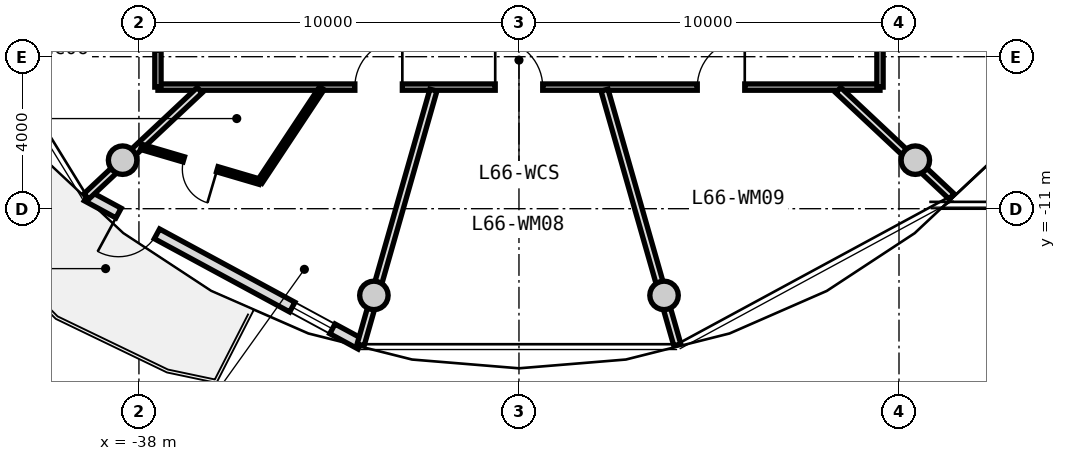
"""IFC4 building model, lengths in metres.
Left out: names, types, materials, properties, quantities, classifications, styles, units other than length and angle.
Written with IfcOpenShell. Run it as: python <this file> out.ifc"""

import sys

from ifc_helpers import new_model, si_unit, direction, frame, frame_2d, origin, origin_2d, place, context, subcontext, project, spatial, rectangle, circle, extrude, source, transform, mapped, element, fill, save


model = new_model("IFC4")
c1 = context("Model", 3, precision=1e-05, world=origin(), true_north=direction((0.0, 1.0)))
c2 = subcontext(c1, "Body", "Model", "MODEL_VIEW")
j1 = project(units=[si_unit("LENGTHUNIT", "METRE"), si_unit("PLANEANGLEUNIT", "RADIAN")], contexts=[c1])
p1 = place(None, origin())
s1 = spatial("IfcSite", under=j1, at=p1, CompositionType="ELEMENT")
p2 = place(p1, origin())
s2 = spatial("IfcBuilding", under=s1, at=p2, CompositionType="ELEMENT")
p3 = place(p2, frame((0.0, 0.0, 213.9)))
s3 = spatial("IfcBuildingStorey", under=s2, at=p3, CompositionType="ELEMENT", Elevation=213.9)
m1 = source(origin(), c2, "Body", "SweptSolid", [
    extrude(circle(Radius=0.375, at=origin_2d()), origin(), (0.0, 0.0, 1.0), 3.05),
])
for number, where, z_axis, x_axis in (
    (1, (-38.43, -9.723, 0.0), (0.0, 0.0, 1.0), (1.0, 0.0, 0.0)),
    (2, (-31.818, -13.281, 0.0), (0.0, 0.0, 1.0), (1.0, 0.0, 0.0)),
    (3, (-24.182, -13.281, 0.0), (0.0, 0.0, 1.0), (1.0, 0.0, 0.0)),
    (4, (-17.57, -9.723, 0.0), (0.0, 0.0, 1.0), (1.0, 0.0, 0.0)),
):
    element("IfcColumn", number, at=place(p3, frame(where, z_axis=z_axis, x_axis=x_axis)), inside=s3, PredefinedType="COLUMN", context=c2, shape_type="MappedRepresentation", body=[
        mapped(m1, transform((0.0, 0.0, 0.0), x_axis=(1.0, 0.0, 0.0), y_axis=(0.0, 1.0, 0.0), z_axis=(0.0, 0.0, 1.0), scale=1.0)),
    ])
m2 = source(origin(), c2, "Body", "SweptSolid", [
    extrude(rectangle(XDim=8.197, YDim=0.29, at=frame_2d((4.099, 0.0))), origin(), (0.0, 0.0, 1.0), 2.76),
])
p4 = place(p3, frame((-32.162, -14.566, 0.0), z_axis=(0.0, 0.0, 1.0), x_axis=(-0.879369910001, 0.476139224791, 0.0)))
e5 = element("IfcWall", 5, at=p4, inside=s3, PredefinedType="SOLIDWALL", context=c2, shape_type="MappedRepresentation", body=[
    mapped(m2, transform((0.0, 0.0, 0.0), x_axis=(1.0, 0.0, 0.0), y_axis=(0.0, 1.0, 0.0), z_axis=(0.0, 0.0, 1.0), scale=1.0)),
])
p5 = place(p4, frame((6.1, 0.0, 0.0)))
e6 = element("IfcOpeningElement", 6, at=p5, cuts=e5, PredefinedType="OPENING", context=c2, shape_type="SweptSolid", body=[
    extrude(rectangle(XDim=1.15, YDim=2.25, at=frame_2d((0.575, 1.125))), frame((0.0, 0.155, 0.0), z_axis=(0.0, -1.0, 0.0), x_axis=(1.0, 0.0, 0.0)), (0.0, 0.0, 1.0), 0.31),
])
p6 = place(p4, frame((0.85, 0.0, 0.85)))
e7 = element("IfcOpeningElement", 7, at=p6, cuts=e5, PredefinedType="OPENING", context=c2, shape_type="SweptSolid", body=[
    extrude(rectangle(XDim=1.2, YDim=1.5, at=frame_2d((0.6, 0.75))), frame((0.0, 0.155, 0.0), z_axis=(0.0, -1.0, 0.0), x_axis=(1.0, 0.0, 0.0)), (0.0, 0.0, 1.0), 0.31),
])
m3 = source(origin(), c2, "Body", "SweptSolid", [
    extrude(rectangle(XDim=19.0, YDim=0.165, at=frame_2d((9.5, 0.0))), origin(), (0.0, 0.0, 1.0), 2.745),
])
p7 = place(p3, frame((-18.5, -7.8, 0.0), z_axis=(0.0, 0.0, 1.0), x_axis=(-1.0, 0.0, 0.0)))
e8 = element("IfcWall", 8, at=p7, inside=s3, PredefinedType="PARTITIONING", context=c2, shape_type="MappedRepresentation", body=[
    mapped(m3, transform((0.0, 0.0, 0.0), x_axis=(1.0, 0.0, 0.0), y_axis=(0.0, 1.0, 0.0), z_axis=(0.0, 0.0, 1.0), scale=1.0)),
])
p8 = place(p7, frame((12.569, 0.0, 0.0)))
e9 = element("IfcOpeningElement", 9, at=p8, cuts=e8, PredefinedType="OPENING", context=c2, shape_type="SweptSolid", body=[
    extrude(rectangle(XDim=1.25, YDim=2.2, at=frame_2d((0.625, 1.1))), frame((0.0, 0.093, 0.0), z_axis=(0.0, -1.0, 0.0), x_axis=(1.0, 0.0, 0.0)), (0.0, 0.0, 1.0), 0.185),
])
p9 = place(p7, frame((8.875, 0.0, 0.0)))
e10 = element("IfcOpeningElement", 10, at=p9, cuts=e8, PredefinedType="OPENING", context=c2, shape_type="SweptSolid", body=[
    extrude(rectangle(XDim=1.25, YDim=2.2, at=frame_2d((0.625, 1.1))), frame((0.0, 0.093, 0.0), z_axis=(0.0, -1.0, 0.0), x_axis=(1.0, 0.0, 0.0)), (0.0, 0.0, 1.0), 0.185),
])
p10 = place(p7, frame((3.559, 0.0, 0.0)))
e11 = element("IfcOpeningElement", 11, at=p10, cuts=e8, PredefinedType="OPENING", context=c2, shape_type="SweptSolid", body=[
    extrude(rectangle(XDim=1.25, YDim=2.2, at=frame_2d((0.625, 1.1))), frame((0.0, 0.093, 0.0), z_axis=(0.0, -1.0, 0.0), x_axis=(1.0, 0.0, 0.0)), (0.0, 0.0, 1.0), 0.185),
])
m4 = source(origin(), c2, "Body", "SweptSolid", [
    extrude(rectangle(XDim=6.88, YDim=0.165, at=frame_2d((3.44, 0.0))), origin(), (0.0, 0.0, 1.0), 2.745),
])
p11 = place(p3, frame((-37.5, -7.8, 0.0), z_axis=(0.0, 0.0, 1.0), x_axis=(0.0, 1.0, 0.0)))
e12 = element("IfcWall", 12, at=p11, inside=s3, PredefinedType="PARTITIONING", context=c2, shape_type="MappedRepresentation", body=[
    mapped(m4, transform((0.0, 0.0, 0.0), x_axis=(1.0, 0.0, 0.0), y_axis=(0.0, 1.0, 0.0), z_axis=(0.0, 0.0, 1.0), scale=1.0)),
])
p12 = place(p11, frame((0.968, 0.0, 0.0)))
e13 = element("IfcOpeningElement", 13, at=p12, cuts=e12, PredefinedType="OPENING", context=c2, shape_type="SweptSolid", body=[
    extrude(rectangle(XDim=1.25, YDim=2.2, at=frame_2d((0.625, 1.1))), frame((0.0, 0.093, 0.0), z_axis=(0.0, -1.0, 0.0), x_axis=(1.0, 0.0, 0.0)), (0.0, 0.0, 1.0), 0.185),
])
p13 = place(p3, frame((-18.5, -0.92, 0.0), z_axis=(0.0, 0.0, 1.0), x_axis=(0.0, -1.0, 0.0)))
e14 = element("IfcWall", 14, at=p13, inside=s3, PredefinedType="PARTITIONING", context=c2, shape_type="MappedRepresentation", body=[
    mapped(m4, transform((0.0, 0.0, 0.0), x_axis=(1.0, 0.0, 0.0), y_axis=(0.0, 1.0, 0.0), z_axis=(0.0, 0.0, 1.0), scale=1.0)),
])
p14 = place(p13, frame((3.464, 0.0, 0.0)))
e15 = element("IfcOpeningElement", 15, at=p14, cuts=e14, PredefinedType="OPENING", context=c2, shape_type="SweptSolid", body=[
    extrude(rectangle(XDim=1.25, YDim=2.2, at=frame_2d((0.625, 1.1))), frame((0.0, 0.093, 0.0), z_axis=(0.0, -1.0, 0.0), x_axis=(1.0, 0.0, 0.0)), (0.0, 0.0, 1.0), 0.185),
])
m5 = source(origin(), c2, "Body", "SweptSolid", [
    extrude(rectangle(XDim=4.089, YDim=0.19, at=frame_2d((2.044, 0.0))), origin(), (0.0, 0.0, 1.0), 2.345),
])
p15 = place(p3, frame((-36.402, -7.88, 0.0), z_axis=(0.0, 0.0, 1.0), x_axis=(-0.729401273609, -0.684086092577, 0.0)))
e16 = element("IfcWall", 16, at=p15, inside=s3, PredefinedType="PARTITIONING", context=c2, shape_type="MappedRepresentation", body=[
    mapped(m5, transform((0.0, 0.0, 0.0), x_axis=(1.0, 0.0, 0.0), y_axis=(0.0, 1.0, 0.0), z_axis=(0.0, 0.0, 1.0), scale=1.0)),
])
m6 = source(origin(), c2, "Body", "SweptSolid", [
    extrude(rectangle(XDim=6.974, YDim=0.19, at=frame_2d((3.487, 0.0))), origin(), (0.0, 0.0, 1.0), 2.345),
])
p16 = place(p3, frame((-30.251, -7.88, 0.0), z_axis=(0.0, 0.0, 1.0), x_axis=(-0.274707256801, -0.961527910703, 0.0)))
e17 = element("IfcWall", 17, at=p16, inside=s3, PredefinedType="PARTITIONING", context=c2, shape_type="MappedRepresentation", body=[
    mapped(m6, transform((0.0, 0.0, 0.0), x_axis=(1.0, 0.0, 0.0), y_axis=(0.0, 1.0, 0.0), z_axis=(0.0, 0.0, 1.0), scale=1.0)),
])
m7 = source(origin(), c2, "Body", "SweptSolid", [
    extrude(rectangle(XDim=2.953, YDim=0.14, at=frame_2d((1.476, 0.0))), origin(), (0.0, 0.0, 1.0), 2.745),
])
p17 = place(p3, frame((-33.188, -7.83, 0.0), z_axis=(0.0, 0.0, 1.0), x_axis=(-0.552427436518, -0.833560991999, 0.0)))
e18 = element("IfcWall", 18, at=p17, inside=s3, PredefinedType="PARTITIONING", context=c2, shape_type="MappedRepresentation", body=[
    mapped(m7, transform((0.0, 0.0, 0.0), x_axis=(1.0, 0.0, 0.0), y_axis=(0.0, 1.0, 0.0), z_axis=(0.0, 0.0, 1.0), scale=1.0)),
])
m8 = source(origin(), c2, "Body", "SweptSolid", [
    extrude(rectangle(XDim=3.252, YDim=0.14, at=frame_2d((1.626, 0.0))), origin(), (0.0, 0.0, 1.0), 2.745),
])
p18 = place(p3, frame((-34.82, -10.291, 0.0), z_axis=(0.0, 0.0, 1.0), x_axis=(-0.959294945864, 0.282406102695, 0.0)))
e19 = element("IfcWall", 19, at=p18, inside=s3, PredefinedType="PARTITIONING", context=c2, shape_type="MappedRepresentation", body=[
    mapped(m8, transform((0.0, 0.0, 0.0), x_axis=(1.0, 0.0, 0.0), y_axis=(0.0, 1.0, 0.0), z_axis=(0.0, 0.0, 1.0), scale=1.0)),
])
p19 = place(p18, frame((1.166, 0.0, 0.0)))
e20 = element("IfcOpeningElement", 20, at=p19, cuts=e19, PredefinedType="OPENING", context=c2, shape_type="SweptSolid", body=[
    extrude(rectangle(XDim=0.92, YDim=2.1, at=frame_2d((0.46, 1.05))), frame((0.0, 0.08, 0.0), z_axis=(0.0, -1.0, 0.0), x_axis=(1.0, 0.0, 0.0)), (0.0, 0.0, 1.0), 0.16),
])
p20 = place(p3, frame((-25.749, -7.88, 0.0), z_axis=(0.0, 0.0, 1.0), x_axis=(0.274707256801, -0.961527910703, 0.0)))
e21 = element("IfcWall", 21, at=p20, inside=s3, PredefinedType="PARTITIONING", context=c2, shape_type="MappedRepresentation", body=[
    mapped(m6, transform((0.0, 0.0, 0.0), x_axis=(1.0, 0.0, 0.0), y_axis=(0.0, 1.0, 0.0), z_axis=(0.0, 0.0, 1.0), scale=1.0)),
])
p21 = place(p3, frame((-19.598, -7.88, 0.0), z_axis=(0.0, 0.0, 1.0), x_axis=(0.729401273609, -0.684086092577, 0.0)))
e22 = element("IfcWall", 22, at=p21, inside=s3, PredefinedType="PARTITIONING", context=c2, shape_type="MappedRepresentation", body=[
    mapped(m5, transform((0.0, 0.0, 0.0), x_axis=(1.0, 0.0, 0.0), y_axis=(0.0, 1.0, 0.0), z_axis=(0.0, 0.0, 1.0), scale=1.0)),
])
m9 = source(origin(), c2, "Body", "SweptSolid", [
    extrude(rectangle(XDim=1.15, YDim=2.25, at=frame_2d((0.575, 1.125))), frame((0.0, 0.025, 0.0), z_axis=(0.0, -1.0, 0.0), x_axis=(1.0, 0.0, 0.0)), (0.0, 0.0, 1.0), 0.05),
])
p22 = place(p5, origin())
e23 = element("IfcDoor", 23, at=p22, inside=s3, OperationType="SINGLE_SWING_RIGHT", PredefinedType="DOOR", context=c2, shape_type="MappedRepresentation", body=[
    mapped(m9, transform((0.0, 0.0, 0.0), x_axis=(1.0, 0.0, 0.0), y_axis=(0.0, 1.0, 0.0), z_axis=(0.0, 0.0, 1.0), scale=1.0)),
])
fill(e6, e23)
m10 = source(origin(), c2, "Body", "SweptSolid", [
    extrude(rectangle(XDim=1.2, YDim=1.5, at=frame_2d((0.6, 0.75))), frame((0.0, 0.03, 0.0), z_axis=(0.0, -1.0, 0.0), x_axis=(1.0, 0.0, 0.0)), (0.0, 0.0, 1.0), 0.06),
])
p23 = place(p6, origin())
e24 = element("IfcWindow", 24, at=p23, inside=s3, PartitioningType="SINGLE_PANEL", PredefinedType="WINDOW", context=c2, shape_type="MappedRepresentation", body=[
    mapped(m10, transform((0.0, 0.0, 0.0), x_axis=(1.0, 0.0, 0.0), y_axis=(0.0, 1.0, 0.0), z_axis=(0.0, 0.0, 1.0), scale=1.0)),
])
fill(e7, e24)
m11 = source(origin(), c2, "Body", "SweptSolid", [
    extrude(rectangle(XDim=1.25, YDim=2.2, at=frame_2d((0.625, 1.1))), frame((0.0, 0.025, 0.0), z_axis=(0.0, -1.0, 0.0), x_axis=(1.0, 0.0, 0.0)), (0.0, 0.0, 1.0), 0.05),
])
p24 = place(p8, frame((1.25, 0.0, 0.0), z_axis=(0.0, 0.0, 1.0), x_axis=(-1.0, 0.0, 0.0)))
e25 = element("IfcDoor", 25, at=p24, inside=s3, OperationType="SINGLE_SWING_RIGHT", PredefinedType="DOOR", context=c2, shape_type="MappedRepresentation", body=[
    mapped(m11, transform((0.0, 0.0, 0.0), x_axis=(1.0, 0.0, 0.0), y_axis=(0.0, 1.0, 0.0), z_axis=(0.0, 0.0, 1.0), scale=1.0)),
])
fill(e9, e25)
m12 = source(origin(), c2, "Body", "SweptSolid", [
    extrude(rectangle(XDim=0.92, YDim=2.1, at=frame_2d((0.46, 1.05))), frame((0.0, 0.025, 0.0), z_axis=(0.0, -1.0, 0.0), x_axis=(1.0, 0.0, 0.0)), (0.0, 0.0, 1.0), 0.05),
])
p25 = place(p19, origin())
e26 = element("IfcDoor", 26, at=p25, inside=s3, OperationType="SINGLE_SWING_LEFT", PredefinedType="DOOR", context=c2, shape_type="MappedRepresentation", body=[
    mapped(m12, transform((0.0, 0.0, 0.0), x_axis=(1.0, 0.0, 0.0), y_axis=(0.0, 1.0, 0.0), z_axis=(0.0, 0.0, 1.0), scale=1.0)),
])
fill(e20, e26)
p26 = place(p9, frame((1.25, 0.0, 0.0), z_axis=(0.0, 0.0, 1.0), x_axis=(-1.0, 0.0, 0.0)))
e27 = element("IfcDoor", 27, at=p26, inside=s3, OperationType="SINGLE_SWING_LEFT", PredefinedType="DOOR", context=c2, shape_type="MappedRepresentation", body=[
    mapped(m11, transform((0.0, 0.0, 0.0), x_axis=(1.0, 0.0, 0.0), y_axis=(0.0, 1.0, 0.0), z_axis=(0.0, 0.0, 1.0), scale=1.0)),
])
fill(e10, e27)
p27 = place(p10, frame((1.25, 0.0, 0.0), z_axis=(0.0, 0.0, 1.0), x_axis=(-1.0, 0.0, 0.0)))
e28 = element("IfcDoor", 28, at=p27, inside=s3, OperationType="SINGLE_SWING_RIGHT", PredefinedType="DOOR", context=c2, shape_type="MappedRepresentation", body=[
    mapped(m11, transform((0.0, 0.0, 0.0), x_axis=(1.0, 0.0, 0.0), y_axis=(0.0, 1.0, 0.0), z_axis=(0.0, 0.0, 1.0), scale=1.0)),
])
fill(e11, e28)
save(model, sys.argv[1])
